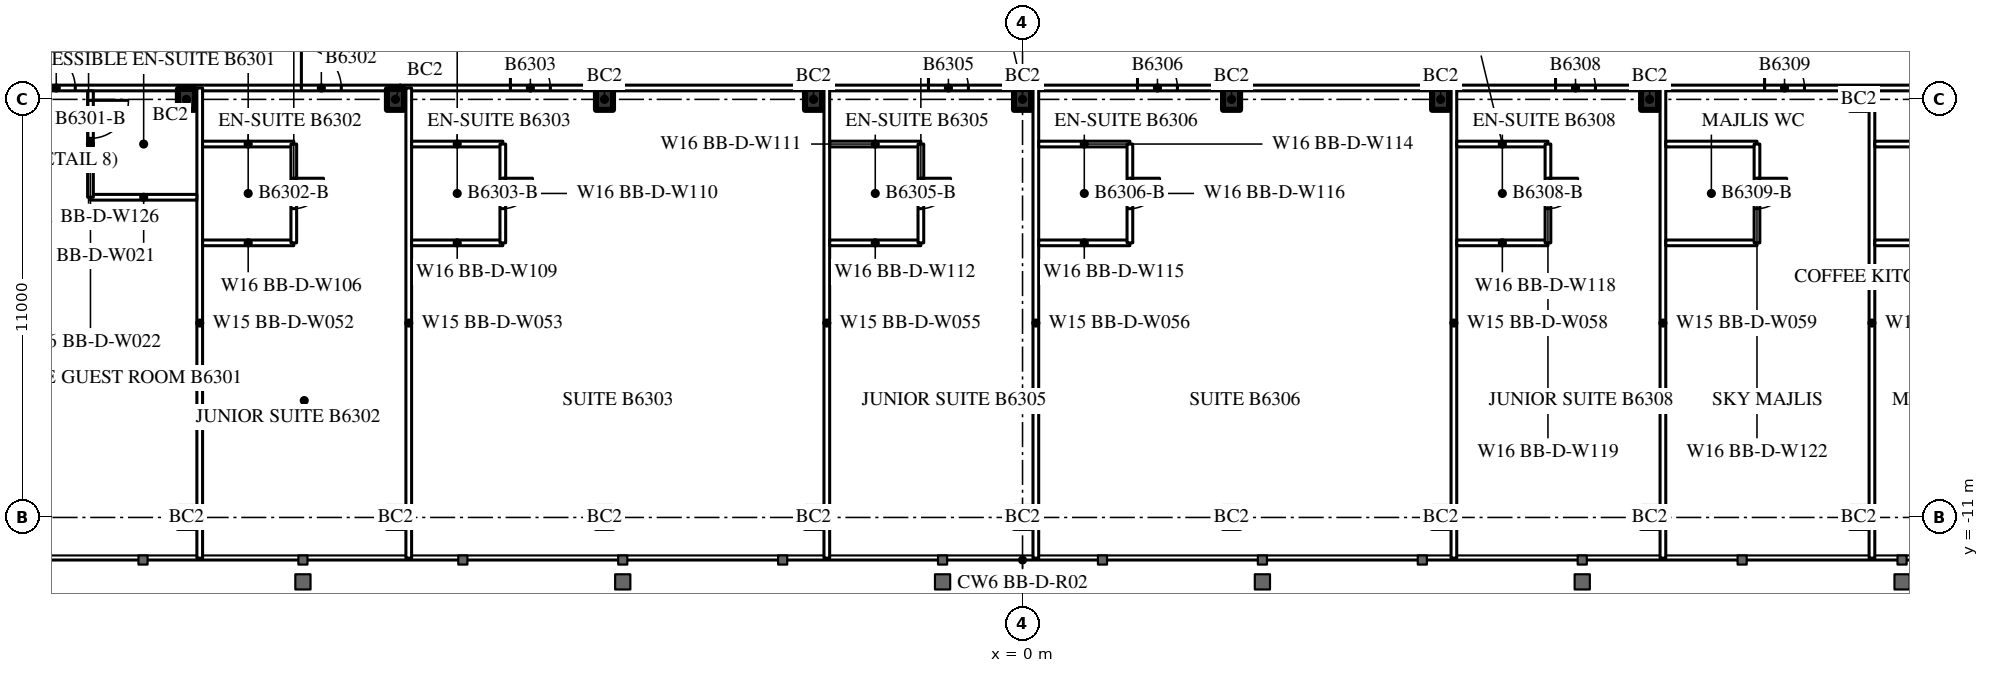
"""IFC4 building model, lengths in metres.
Left out: names, types, materials, properties, quantities, classifications, styles, units other than length and angle.
Written with IfcOpenShell. Run it as: python <this file> out.ifc"""

import sys

from ifc_helpers import new_model, si_unit, direction, frame, frame_2d, origin, origin_2d, place, context, subcontext, project, spatial, rectangle, i_section, extrude, element, fill, save


model = new_model("IFC4")
c1 = context("Model", 3, precision=1e-05, world=origin(), true_north=direction((0.0, 1.0)))
c2 = subcontext(c1, "Body", "Model", "MODEL_VIEW")
j1 = project(units=[si_unit("LENGTHUNIT", "METRE"), si_unit("PLANEANGLEUNIT", "RADIAN")], contexts=[c1])
p1 = place(None, origin())
s1 = spatial("IfcSite", under=j1, at=p1, CompositionType="ELEMENT")
p2 = place(p1, origin())
s2 = spatial("IfcBuilding", under=s1, at=p2, CompositionType="ELEMENT")
p3 = place(p2, frame((0.0, 0.0, 236.9)))
s3 = spatial("IfcBuildingStorey", under=s2, at=p3, CompositionType="ELEMENT", Elevation=236.9)
for number, where, z_axis, x_axis in (
    (1, (-22.0, -11.0, 0.0), (0.0, 0.0, 1.0), (1.0, 0.0, 0.0)),
    (2, (-16.5, -11.0, 0.0), (0.0, 0.0, 1.0), (1.0, 0.0, 0.0)),
    (3, (-11.0, -11.0, 0.0), (0.0, 0.0, 1.0), (1.0, 0.0, 0.0)),
    (4, (-5.5, -11.0, 0.0), (0.0, 0.0, 1.0), (1.0, 0.0, 0.0)),
    (5, (0.0, -11.0, 0.0), (0.0, 0.0, 1.0), (1.0, 0.0, 0.0)),
    (6, (5.5, -11.0, 0.0), (0.0, 0.0, 1.0), (1.0, 0.0, 0.0)),
    (7, (11.0, -11.0, 0.0), (0.0, 0.0, 1.0), (1.0, 0.0, 0.0)),
    (8, (16.5, -11.0, 0.0), (0.0, 0.0, 1.0), (1.0, 0.0, 0.0)),
    (9, (22.0, -11.0, 0.0), (0.0, 0.0, 1.0), (1.0, 0.0, 0.0)),
    (10, (-22.0, 0.0, 0.0), (0.0, 0.0, 1.0), (1.0, 0.0, 0.0)),
    (11, (-16.5, 0.0, 0.0), (0.0, 0.0, 1.0), (1.0, 0.0, 0.0)),
    (12, (-11.0, 0.0, 0.0), (0.0, 0.0, 1.0), (1.0, 0.0, 0.0)),
    (13, (-5.5, 0.0, 0.0), (0.0, 0.0, 1.0), (1.0, 0.0, 0.0)),
    (14, (0.0, 0.0, 0.0), (0.0, 0.0, 1.0), (1.0, 0.0, 0.0)),
    (15, (5.5, 0.0, 0.0), (0.0, 0.0, 1.0), (1.0, 0.0, 0.0)),
    (16, (11.0, 0.0, 0.0), (0.0, 0.0, 1.0), (1.0, 0.0, 0.0)),
    (17, (16.5, 0.0, 0.0), (0.0, 0.0, 1.0), (1.0, 0.0, 0.0)),
    (18, (22.0, 0.0, 0.0), (0.0, 0.0, 1.0), (1.0, 0.0, 0.0)),
):
    element("IfcColumn", number, at=place(p3, frame(where, z_axis=z_axis, x_axis=x_axis)), inside=s3, PredefinedType="COLUMN", context=c2, shape_type="SweptSolid", body=[
        extrude(i_section(OverallWidth=0.448, OverallDepth=0.55, WebThickness=0.072, FlangeThickness=0.115, FilletRadius=0.02, at=origin_2d()), origin(), (0.0, 0.0, 1.0), 3.6),
    ])
p4 = place(p3, frame((-27.5, 0.3, 0.0), z_axis=(0.0, 0.0, 1.0), x_axis=(1.0, 0.0, 0.0)))
e19 = element("IfcWall", 19, at=p4, inside=s3, PredefinedType="PARTITIONING", context=c2, shape_type="SweptSolid", body=[
    extrude(rectangle(XDim=55.0, YDim=0.15, at=frame_2d((27.5, 0.0))), origin(), (0.0, 0.0, 1.0), 2.4),
])
p5 = place(p4, frame((1.575, 0.0, 0.0)))
e20 = element("IfcOpeningElement", 20, at=p5, cuts=e19, PredefinedType="OPENING", context=c2, shape_type="SweptSolid", body=[
    extrude(rectangle(XDim=1.0, YDim=2.2, at=frame_2d((0.5, 1.1))), frame((0.0, 0.085, 0.0), z_axis=(0.0, -1.0, 0.0), x_axis=(1.0, 0.0, 0.0)), (0.0, 0.0, 1.0), 0.17),
])
p6 = place(p4, frame((8.525, 0.0, 0.0)))
e21 = element("IfcOpeningElement", 21, at=p6, cuts=e19, PredefinedType="OPENING", context=c2, shape_type="SweptSolid", body=[
    extrude(rectangle(XDim=1.05, YDim=2.4, at=frame_2d((0.525, 1.2))), frame((0.0, 0.085, 0.0), z_axis=(0.0, -1.0, 0.0), x_axis=(1.0, 0.0, 0.0)), (0.0, 0.0, 1.0), 0.17),
])
p7 = place(p4, frame((14.025, 0.0, 0.0)))
e22 = element("IfcOpeningElement", 22, at=p7, cuts=e19, PredefinedType="OPENING", context=c2, shape_type="SweptSolid", body=[
    extrude(rectangle(XDim=1.05, YDim=2.4, at=frame_2d((0.525, 1.2))), frame((0.0, 0.085, 0.0), z_axis=(0.0, -1.0, 0.0), x_axis=(1.0, 0.0, 0.0)), (0.0, 0.0, 1.0), 0.17),
])
p8 = place(p4, frame((25.025, 0.0, 0.0)))
e23 = element("IfcOpeningElement", 23, at=p8, cuts=e19, PredefinedType="OPENING", context=c2, shape_type="SweptSolid", body=[
    extrude(rectangle(XDim=1.05, YDim=2.4, at=frame_2d((0.525, 1.2))), frame((0.0, 0.085, 0.0), z_axis=(0.0, -1.0, 0.0), x_axis=(1.0, 0.0, 0.0)), (0.0, 0.0, 1.0), 0.17),
])
p9 = place(p4, frame((30.525, 0.0, 0.0)))
e24 = element("IfcOpeningElement", 24, at=p9, cuts=e19, PredefinedType="OPENING", context=c2, shape_type="SweptSolid", body=[
    extrude(rectangle(XDim=1.05, YDim=2.4, at=frame_2d((0.525, 1.2))), frame((0.0, 0.085, 0.0), z_axis=(0.0, -1.0, 0.0), x_axis=(1.0, 0.0, 0.0)), (0.0, 0.0, 1.0), 0.17),
])
p10 = place(p4, frame((41.525, 0.0, 0.0)))
e25 = element("IfcOpeningElement", 25, at=p10, cuts=e19, PredefinedType="OPENING", context=c2, shape_type="SweptSolid", body=[
    extrude(rectangle(XDim=1.05, YDim=2.4, at=frame_2d((0.525, 1.2))), frame((0.0, 0.085, 0.0), z_axis=(0.0, -1.0, 0.0), x_axis=(1.0, 0.0, 0.0)), (0.0, 0.0, 1.0), 0.17),
])
p11 = place(p4, frame((47.025, 0.0, 0.0)))
e26 = element("IfcOpeningElement", 26, at=p11, cuts=e19, PredefinedType="OPENING", context=c2, shape_type="SweptSolid", body=[
    extrude(rectangle(XDim=1.05, YDim=2.4, at=frame_2d((0.525, 1.2))), frame((0.0, 0.085, 0.0), z_axis=(0.0, -1.0, 0.0), x_axis=(1.0, 0.0, 0.0)), (0.0, 0.0, 1.0), 0.17),
])
p12 = place(p4, frame((52.525, 0.0, 0.0)))
e27 = element("IfcOpeningElement", 27, at=p12, cuts=e19, PredefinedType="OPENING", context=c2, shape_type="SweptSolid", body=[
    extrude(rectangle(XDim=1.05, YDim=2.4, at=frame_2d((0.525, 1.2))), frame((0.0, 0.085, 0.0), z_axis=(0.0, -1.0, 0.0), x_axis=(1.0, 0.0, 0.0)), (0.0, 0.0, 1.0), 0.17),
])
for number, where, z_axis, x_axis in (
    (28, (-21.65, -12.07, 0.0), (0.0, 0.0, 1.0), (0.0, 1.0, 0.0)),
    (29, (-16.15, -12.07, 0.0), (0.0, 0.0, 1.0), (0.0, 1.0, 0.0)),
    (30, (-5.15, -12.07, 0.0), (0.0, 0.0, 1.0), (0.0, 1.0, 0.0)),
    (31, (0.35, -12.07, 0.0), (0.0, 0.0, 1.0), (0.0, 1.0, 0.0)),
    (32, (11.35, -12.07, 0.0), (0.0, 0.0, 1.0), (0.0, 1.0, 0.0)),
    (33, (16.85, -12.07, 0.0), (0.0, 0.0, 1.0), (0.0, 1.0, 0.0)),
    (34, (22.35, -12.07, 0.0), (0.0, 0.0, 1.0), (0.0, 1.0, 0.0)),
):
    element("IfcWall", number, at=place(p3, frame(where, z_axis=z_axis, x_axis=x_axis)), inside=s3, PredefinedType="PARTITIONING", context=c2, shape_type="SweptSolid", body=[
        extrude(rectangle(XDim=12.37, YDim=0.15, at=frame_2d((6.185, 0.0))), origin(), (0.0, 0.0, 1.0), 3.4),
    ])
p13 = place(p3, frame((-24.525, -2.575, 0.0), z_axis=(0.0, 0.0, 1.0), x_axis=(1.0, 0.0, 0.0)))
e35 = element("IfcWall", 35, at=p13, inside=s3, PredefinedType="PARTITIONING", context=c2, shape_type="SweptSolid", body=[
    extrude(rectangle(XDim=2.8, YDim=0.15, at=frame_2d((1.4, 0.0))), origin(), (0.0, 0.0, 1.0), 3.4),
])
p14 = place(p3, frame((-24.525, -2.575, 0.0), z_axis=(0.0, 0.0, 1.0), x_axis=(0.0, 1.0, 0.0)))
e36 = element("IfcWall", 36, at=p14, inside=s3, PredefinedType="PARTITIONING", context=c2, shape_type="SweptSolid", body=[
    extrude(rectangle(XDim=2.8, YDim=0.15, at=frame_2d((1.4, 0.0))), origin(), (0.0, 0.0, 1.0), 3.4),
])
p15 = place(p14, frame((1.55, 0.0, 0.0)))
e37 = element("IfcOpeningElement", 37, at=p15, cuts=e36, PredefinedType="OPENING", context=c2, shape_type="SweptSolid", body=[
    extrude(rectangle(XDim=1.0, YDim=2.2, at=frame_2d((0.5, 1.1))), frame((0.0, 0.085, 0.0), z_axis=(0.0, -1.0, 0.0), x_axis=(1.0, 0.0, 0.0)), (0.0, 0.0, 1.0), 0.17),
])
for number, where, z_axis, x_axis in (
    (38, (-21.575, -3.775, 0.0), (0.0, 0.0, 1.0), (1.0, 0.0, 0.0)),
    (39, (-21.575, -1.175, 0.0), (0.0, 0.0, 1.0), (1.0, 0.0, 0.0)),
):
    element("IfcWall", number, at=place(p3, frame(where, z_axis=z_axis, x_axis=x_axis)), inside=s3, PredefinedType="PARTITIONING", context=c2, shape_type="SweptSolid", body=[
        extrude(rectangle(XDim=2.4, YDim=0.15, at=frame_2d((1.2, 0.0))), origin(), (0.0, 0.0, 1.0), 3.4),
    ])
p16 = place(p3, frame((-19.175, -3.775, 0.0), z_axis=(0.0, 0.0, 1.0), x_axis=(0.0, 1.0, 0.0)))
e40 = element("IfcWall", 40, at=p16, inside=s3, PredefinedType="PARTITIONING", context=c2, shape_type="SweptSolid", body=[
    extrude(rectangle(XDim=2.6, YDim=0.15, at=frame_2d((1.3, 0.0))), origin(), (0.0, 0.0, 1.0), 3.4),
])
p17 = place(p16, frame((0.9, 0.0, 0.0)))
e41 = element("IfcOpeningElement", 41, at=p17, cuts=e40, PredefinedType="OPENING", context=c2, shape_type="SweptSolid", body=[
    extrude(rectangle(XDim=0.8, YDim=2.2, at=frame_2d((0.4, 1.1))), frame((0.0, 0.085, 0.0), z_axis=(0.0, -1.0, 0.0), x_axis=(1.0, 0.0, 0.0)), (0.0, 0.0, 1.0), 0.17),
])
for number, where, z_axis, x_axis in (
    (42, (-16.075, -3.775, 0.0), (0.0, 0.0, 1.0), (1.0, 0.0, 0.0)),
    (43, (-16.075, -1.175, 0.0), (0.0, 0.0, 1.0), (1.0, 0.0, 0.0)),
):
    element("IfcWall", number, at=place(p3, frame(where, z_axis=z_axis, x_axis=x_axis)), inside=s3, PredefinedType="PARTITIONING", context=c2, shape_type="SweptSolid", body=[
        extrude(rectangle(XDim=2.4, YDim=0.15, at=frame_2d((1.2, 0.0))), origin(), (0.0, 0.0, 1.0), 3.4),
    ])
p18 = place(p3, frame((-13.675, -3.775, 0.0), z_axis=(0.0, 0.0, 1.0), x_axis=(0.0, 1.0, 0.0)))
e44 = element("IfcWall", 44, at=p18, inside=s3, PredefinedType="PARTITIONING", context=c2, shape_type="SweptSolid", body=[
    extrude(rectangle(XDim=2.6, YDim=0.15, at=frame_2d((1.3, 0.0))), origin(), (0.0, 0.0, 1.0), 3.4),
])
p19 = place(p18, frame((0.9, 0.0, 0.0)))
e45 = element("IfcOpeningElement", 45, at=p19, cuts=e44, PredefinedType="OPENING", context=c2, shape_type="SweptSolid", body=[
    extrude(rectangle(XDim=0.8, YDim=2.2, at=frame_2d((0.4, 1.1))), frame((0.0, 0.085, 0.0), z_axis=(0.0, -1.0, 0.0), x_axis=(1.0, 0.0, 0.0)), (0.0, 0.0, 1.0), 0.17),
])
for number, where, z_axis, x_axis in (
    (46, (-5.075, -3.775, 0.0), (0.0, 0.0, 1.0), (1.0, 0.0, 0.0)),
    (47, (-5.075, -1.175, 0.0), (0.0, 0.0, 1.0), (1.0, 0.0, 0.0)),
):
    element("IfcWall", number, at=place(p3, frame(where, z_axis=z_axis, x_axis=x_axis)), inside=s3, PredefinedType="PARTITIONING", context=c2, shape_type="SweptSolid", body=[
        extrude(rectangle(XDim=2.4, YDim=0.15, at=frame_2d((1.2, 0.0))), origin(), (0.0, 0.0, 1.0), 3.4),
    ])
p20 = place(p3, frame((-2.675, -3.775, 0.0), z_axis=(0.0, 0.0, 1.0), x_axis=(0.0, 1.0, 0.0)))
e48 = element("IfcWall", 48, at=p20, inside=s3, PredefinedType="PARTITIONING", context=c2, shape_type="SweptSolid", body=[
    extrude(rectangle(XDim=2.6, YDim=0.15, at=frame_2d((1.3, 0.0))), origin(), (0.0, 0.0, 1.0), 3.4),
])
p21 = place(p20, frame((0.9, 0.0, 0.0)))
e49 = element("IfcOpeningElement", 49, at=p21, cuts=e48, PredefinedType="OPENING", context=c2, shape_type="SweptSolid", body=[
    extrude(rectangle(XDim=0.8, YDim=2.2, at=frame_2d((0.4, 1.1))), frame((0.0, 0.085, 0.0), z_axis=(0.0, -1.0, 0.0), x_axis=(1.0, 0.0, 0.0)), (0.0, 0.0, 1.0), 0.17),
])
for number, where, z_axis, x_axis in (
    (50, (0.425, -3.775, 0.0), (0.0, 0.0, 1.0), (1.0, 0.0, 0.0)),
    (51, (0.425, -1.175, 0.0), (0.0, 0.0, 1.0), (1.0, 0.0, 0.0)),
):
    element("IfcWall", number, at=place(p3, frame(where, z_axis=z_axis, x_axis=x_axis)), inside=s3, PredefinedType="PARTITIONING", context=c2, shape_type="SweptSolid", body=[
        extrude(rectangle(XDim=2.4, YDim=0.15, at=frame_2d((1.2, 0.0))), origin(), (0.0, 0.0, 1.0), 3.4),
    ])
p22 = place(p3, frame((2.825, -3.775, 0.0), z_axis=(0.0, 0.0, 1.0), x_axis=(0.0, 1.0, 0.0)))
e52 = element("IfcWall", 52, at=p22, inside=s3, PredefinedType="PARTITIONING", context=c2, shape_type="SweptSolid", body=[
    extrude(rectangle(XDim=2.6, YDim=0.15, at=frame_2d((1.3, 0.0))), origin(), (0.0, 0.0, 1.0), 3.4),
])
p23 = place(p22, frame((0.9, 0.0, 0.0)))
e53 = element("IfcOpeningElement", 53, at=p23, cuts=e52, PredefinedType="OPENING", context=c2, shape_type="SweptSolid", body=[
    extrude(rectangle(XDim=0.8, YDim=2.2, at=frame_2d((0.4, 1.1))), frame((0.0, 0.085, 0.0), z_axis=(0.0, -1.0, 0.0), x_axis=(1.0, 0.0, 0.0)), (0.0, 0.0, 1.0), 0.17),
])
for number, where, z_axis, x_axis in (
    (54, (11.425, -3.775, 0.0), (0.0, 0.0, 1.0), (1.0, 0.0, 0.0)),
    (55, (11.425, -1.175, 0.0), (0.0, 0.0, 1.0), (1.0, 0.0, 0.0)),
):
    element("IfcWall", number, at=place(p3, frame(where, z_axis=z_axis, x_axis=x_axis)), inside=s3, PredefinedType="PARTITIONING", context=c2, shape_type="SweptSolid", body=[
        extrude(rectangle(XDim=2.4, YDim=0.15, at=frame_2d((1.2, 0.0))), origin(), (0.0, 0.0, 1.0), 3.4),
    ])
p24 = place(p3, frame((13.825, -3.775, 0.0), z_axis=(0.0, 0.0, 1.0), x_axis=(0.0, 1.0, 0.0)))
e56 = element("IfcWall", 56, at=p24, inside=s3, PredefinedType="PARTITIONING", context=c2, shape_type="SweptSolid", body=[
    extrude(rectangle(XDim=2.6, YDim=0.15, at=frame_2d((1.3, 0.0))), origin(), (0.0, 0.0, 1.0), 3.4),
])
p25 = place(p24, frame((0.9, 0.0, 0.0)))
e57 = element("IfcOpeningElement", 57, at=p25, cuts=e56, PredefinedType="OPENING", context=c2, shape_type="SweptSolid", body=[
    extrude(rectangle(XDim=0.8, YDim=2.2, at=frame_2d((0.4, 1.1))), frame((0.0, 0.085, 0.0), z_axis=(0.0, -1.0, 0.0), x_axis=(1.0, 0.0, 0.0)), (0.0, 0.0, 1.0), 0.17),
])
for number, where, z_axis, x_axis in (
    (58, (16.925, -3.775, 0.0), (0.0, 0.0, 1.0), (1.0, 0.0, 0.0)),
    (59, (16.925, -1.175, 0.0), (0.0, 0.0, 1.0), (1.0, 0.0, 0.0)),
):
    element("IfcWall", number, at=place(p3, frame(where, z_axis=z_axis, x_axis=x_axis)), inside=s3, PredefinedType="PARTITIONING", context=c2, shape_type="SweptSolid", body=[
        extrude(rectangle(XDim=2.4, YDim=0.15, at=frame_2d((1.2, 0.0))), origin(), (0.0, 0.0, 1.0), 3.4),
    ])
p26 = place(p3, frame((19.325, -3.775, 0.0), z_axis=(0.0, 0.0, 1.0), x_axis=(0.0, 1.0, 0.0)))
e60 = element("IfcWall", 60, at=p26, inside=s3, PredefinedType="PARTITIONING", context=c2, shape_type="SweptSolid", body=[
    extrude(rectangle(XDim=2.6, YDim=0.15, at=frame_2d((1.3, 0.0))), origin(), (0.0, 0.0, 1.0), 3.4),
])
p27 = place(p26, frame((0.9, 0.0, 0.0)))
e61 = element("IfcOpeningElement", 61, at=p27, cuts=e60, PredefinedType="OPENING", context=c2, shape_type="SweptSolid", body=[
    extrude(rectangle(XDim=0.8, YDim=2.2, at=frame_2d((0.4, 1.1))), frame((0.0, 0.085, 0.0), z_axis=(0.0, -1.0, 0.0), x_axis=(1.0, 0.0, 0.0)), (0.0, 0.0, 1.0), 0.17),
])
for number, where, z_axis, x_axis in (
    (62, (22.425, -3.775, 0.0), (0.0, 0.0, 1.0), (1.0, 0.0, 0.0)),
    (63, (22.425, -1.175, 0.0), (0.0, 0.0, 1.0), (1.0, 0.0, 0.0)),
):
    element("IfcWall", number, at=place(p3, frame(where, z_axis=z_axis, x_axis=x_axis)), inside=s3, PredefinedType="PARTITIONING", context=c2, shape_type="SweptSolid", body=[
        extrude(rectangle(XDim=2.4, YDim=0.15, at=frame_2d((1.2, 0.0))), origin(), (0.0, 0.0, 1.0), 3.4),
    ])
p28 = place(p15, origin())
e64 = element("IfcDoor", 64, at=p28, inside=s3, OperationType="SINGLE_SWING_RIGHT", PredefinedType="DOOR", context=c2, shape_type="SweptSolid", body=[
    extrude(rectangle(XDim=1.0, YDim=2.2, at=frame_2d((0.5, 1.1))), frame((0.0, 0.025, 0.0), z_axis=(0.0, -1.0, 0.0), x_axis=(1.0, 0.0, 0.0)), (0.0, 0.0, 1.0), 0.05),
])
fill(e37, e64)
p29 = place(p5, origin())
e65 = element("IfcDoor", 65, at=p29, inside=s3, OperationType="SINGLE_SWING_LEFT", PredefinedType="DOOR", context=c2, shape_type="SweptSolid", body=[
    extrude(rectangle(XDim=1.0, YDim=2.2, at=frame_2d((0.5, 1.1))), frame((0.0, 0.025, 0.0), z_axis=(0.0, -1.0, 0.0), x_axis=(1.0, 0.0, 0.0)), (0.0, 0.0, 1.0), 0.05),
])
fill(e20, e65)
p30 = place(p17, origin())
e66 = element("IfcDoor", 66, at=p30, inside=s3, OperationType="SINGLE_SWING_RIGHT", PredefinedType="DOOR", context=c2, shape_type="SweptSolid", body=[
    extrude(rectangle(XDim=0.8, YDim=2.2, at=frame_2d((0.4, 1.1))), frame((0.0, 0.025, 0.0), z_axis=(0.0, -1.0, 0.0), x_axis=(1.0, 0.0, 0.0)), (0.0, 0.0, 1.0), 0.05),
])
fill(e41, e66)
p31 = place(p6, origin())
e67 = element("IfcDoor", 67, at=p31, inside=s3, OperationType="SINGLE_SWING_LEFT", PredefinedType="DOOR", context=c2, shape_type="SweptSolid", body=[
    extrude(rectangle(XDim=1.05, YDim=2.4, at=frame_2d((0.525, 1.2))), frame((0.0, 0.025, 0.0), z_axis=(0.0, -1.0, 0.0), x_axis=(1.0, 0.0, 0.0)), (0.0, 0.0, 1.0), 0.05),
])
fill(e21, e67)
p32 = place(p19, origin())
e68 = element("IfcDoor", 68, at=p32, inside=s3, OperationType="SINGLE_SWING_RIGHT", PredefinedType="DOOR", context=c2, shape_type="SweptSolid", body=[
    extrude(rectangle(XDim=0.8, YDim=2.2, at=frame_2d((0.4, 1.1))), frame((0.0, 0.025, 0.0), z_axis=(0.0, -1.0, 0.0), x_axis=(1.0, 0.0, 0.0)), (0.0, 0.0, 1.0), 0.05),
])
fill(e45, e68)
p33 = place(p7, origin())
e69 = element("IfcDoor", 69, at=p33, inside=s3, OperationType="SINGLE_SWING_LEFT", PredefinedType="DOOR", context=c2, shape_type="SweptSolid", body=[
    extrude(rectangle(XDim=1.05, YDim=2.4, at=frame_2d((0.525, 1.2))), frame((0.0, 0.025, 0.0), z_axis=(0.0, -1.0, 0.0), x_axis=(1.0, 0.0, 0.0)), (0.0, 0.0, 1.0), 0.05),
])
fill(e22, e69)
p34 = place(p21, origin())
e70 = element("IfcDoor", 70, at=p34, inside=s3, OperationType="SINGLE_SWING_RIGHT", PredefinedType="DOOR", context=c2, shape_type="SweptSolid", body=[
    extrude(rectangle(XDim=0.8, YDim=2.2, at=frame_2d((0.4, 1.1))), frame((0.0, 0.025, 0.0), z_axis=(0.0, -1.0, 0.0), x_axis=(1.0, 0.0, 0.0)), (0.0, 0.0, 1.0), 0.05),
])
fill(e49, e70)
p35 = place(p8, origin())
e71 = element("IfcDoor", 71, at=p35, inside=s3, OperationType="SINGLE_SWING_LEFT", PredefinedType="DOOR", context=c2, shape_type="SweptSolid", body=[
    extrude(rectangle(XDim=1.05, YDim=2.4, at=frame_2d((0.525, 1.2))), frame((0.0, 0.025, 0.0), z_axis=(0.0, -1.0, 0.0), x_axis=(1.0, 0.0, 0.0)), (0.0, 0.0, 1.0), 0.05),
])
fill(e23, e71)
p36 = place(p23, origin())
e72 = element("IfcDoor", 72, at=p36, inside=s3, OperationType="SINGLE_SWING_RIGHT", PredefinedType="DOOR", context=c2, shape_type="SweptSolid", body=[
    extrude(rectangle(XDim=0.8, YDim=2.2, at=frame_2d((0.4, 1.1))), frame((0.0, 0.025, 0.0), z_axis=(0.0, -1.0, 0.0), x_axis=(1.0, 0.0, 0.0)), (0.0, 0.0, 1.0), 0.05),
])
fill(e53, e72)
p37 = place(p9, origin())
e73 = element("IfcDoor", 73, at=p37, inside=s3, OperationType="SINGLE_SWING_LEFT", PredefinedType="DOOR", context=c2, shape_type="SweptSolid", body=[
    extrude(rectangle(XDim=1.05, YDim=2.4, at=frame_2d((0.525, 1.2))), frame((0.0, 0.025, 0.0), z_axis=(0.0, -1.0, 0.0), x_axis=(1.0, 0.0, 0.0)), (0.0, 0.0, 1.0), 0.05),
])
fill(e24, e73)
p38 = place(p25, origin())
e74 = element("IfcDoor", 74, at=p38, inside=s3, OperationType="SINGLE_SWING_RIGHT", PredefinedType="DOOR", context=c2, shape_type="SweptSolid", body=[
    extrude(rectangle(XDim=0.8, YDim=2.2, at=frame_2d((0.4, 1.1))), frame((0.0, 0.025, 0.0), z_axis=(0.0, -1.0, 0.0), x_axis=(1.0, 0.0, 0.0)), (0.0, 0.0, 1.0), 0.05),
])
fill(e57, e74)
p39 = place(p10, origin())
e75 = element("IfcDoor", 75, at=p39, inside=s3, OperationType="SINGLE_SWING_LEFT", PredefinedType="DOOR", context=c2, shape_type="SweptSolid", body=[
    extrude(rectangle(XDim=1.05, YDim=2.4, at=frame_2d((0.525, 1.2))), frame((0.0, 0.025, 0.0), z_axis=(0.0, -1.0, 0.0), x_axis=(1.0, 0.0, 0.0)), (0.0, 0.0, 1.0), 0.05),
])
fill(e25, e75)
p40 = place(p27, origin())
e76 = element("IfcDoor", 76, at=p40, inside=s3, OperationType="SINGLE_SWING_RIGHT", PredefinedType="DOOR", context=c2, shape_type="SweptSolid", body=[
    extrude(rectangle(XDim=0.8, YDim=2.2, at=frame_2d((0.4, 1.1))), frame((0.0, 0.025, 0.0), z_axis=(0.0, -1.0, 0.0), x_axis=(1.0, 0.0, 0.0)), (0.0, 0.0, 1.0), 0.05),
])
fill(e61, e76)
p41 = place(p11, origin())
e77 = element("IfcDoor", 77, at=p41, inside=s3, OperationType="SINGLE_SWING_LEFT", PredefinedType="DOOR", context=c2, shape_type="SweptSolid", body=[
    extrude(rectangle(XDim=1.05, YDim=2.4, at=frame_2d((0.525, 1.2))), frame((0.0, 0.025, 0.0), z_axis=(0.0, -1.0, 0.0), x_axis=(1.0, 0.0, 0.0)), (0.0, 0.0, 1.0), 0.05),
])
fill(e26, e77)
save(model, sys.argv[1])
